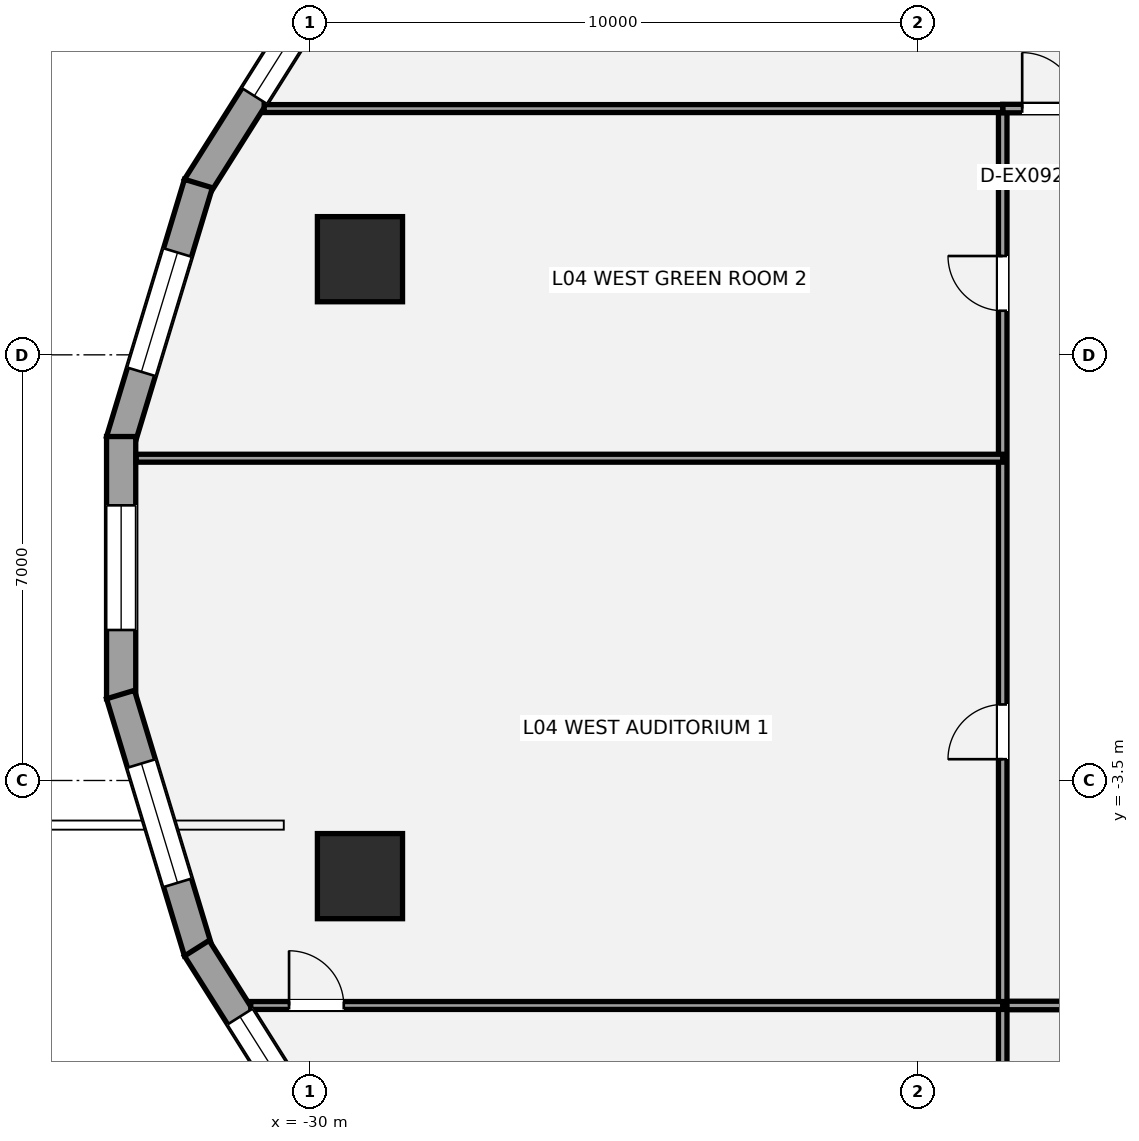
"""IFC4 building model, lengths in metres.
Left out: names, types, materials, properties, quantities, classifications, styles, units other than length and angle.
Written with IfcOpenShell. Run it as: python <this file> out.ifc"""

import sys

from ifc_helpers import new_model, si_unit, direction, frame, frame_2d, origin, origin_2d, place, context, subcontext, project, spatial, rectangle, hollow_circle, extrude, element, fill, save


model = new_model("IFC4")
c1 = context("Model", 3, precision=1e-05, world=origin(), true_north=direction((0.0, 1.0)))
c2 = subcontext(c1, "Body", "Model", "MODEL_VIEW")
j1 = project(units=[si_unit("LENGTHUNIT", "METRE"), si_unit("PLANEANGLEUNIT", "RADIAN")], contexts=[c1])
p1 = place(None, origin())
s1 = spatial("IfcSite", under=j1, at=p1, CompositionType="ELEMENT")
p2 = place(p1, origin())
s2 = spatial("IfcBuilding", under=s1, at=p2, CompositionType="ELEMENT")
p3 = place(p2, frame((0.0, 0.0, 18.6)))
s3 = spatial("IfcBuildingStorey", under=s2, at=p3, CompositionType="ELEMENT", Elevation=18.6)
for number, where, z_axis, x_axis in (
    (1, (-29.171, 5.073, 0.0), (0.0, 0.0, 1.0), (1.0, 0.0, 0.0)),
    (2, (-29.171, -5.073, 0.0), (0.0, 0.0, 1.0), (1.0, 0.0, 0.0)),
):
    element("IfcColumn", number, at=place(p3, frame(where, z_axis=z_axis, x_axis=x_axis)), inside=s3, PredefinedType="USERDEFINED", context=c2, shape_type="SweptSolid", body=[
        extrude(hollow_circle(Radius=0.7, WallThickness=0.05, at=origin_2d()), origin(), (0.0, 0.0, 1.0), 4.2),
    ])
p4 = place(p3, frame((-31.854, 6.258, 0.0), z_axis=(0.0, 0.0, 1.0), x_axis=(0.53349762721, 0.845801561693, 0.0)))
e3 = element("IfcWall", 3, at=p4, inside=s3, PredefinedType="STANDARD", context=c2, shape_type="SweptSolid", body=[
    extrude(rectangle(XDim=4.711, YDim=0.48, at=frame_2d((2.355, 0.0))), origin(), (0.0, 0.0, 1.0), 3.109),
])
p5 = place(p4, frame((1.773, 0.0, 0.72)))
e4 = element("IfcOpeningElement", 4, at=p5, cuts=e3, PredefinedType="OPENING", context=c2, shape_type="SweptSolid", body=[
    extrude(rectangle(XDim=2.05, YDim=1.8, at=frame_2d((1.025, 0.9))), frame((0.0, 0.25, 0.0), z_axis=(0.0, -1.0, 0.0), x_axis=(1.0, 0.0, 0.0)), (0.0, 0.0, 1.0), 0.5),
])
p6 = place(p3, frame((-33.109, 2.087, 0.0), z_axis=(0.0, 0.0, 1.0), x_axis=(0.289855603468, 0.957070388811, 0.0)))
e5 = element("IfcWall", 5, at=p6, inside=s3, PredefinedType="STANDARD", context=c2, shape_type="SweptSolid", body=[
    extrude(rectangle(XDim=4.419, YDim=0.48, at=frame_2d((2.21, 0.0))), origin(), (0.0, 0.0, 1.0), 3.109),
])
p7 = place(p6, frame((1.185, 0.0, 0.72)))
e6 = element("IfcOpeningElement", 6, at=p7, cuts=e5, PredefinedType="OPENING", context=c2, shape_type="SweptSolid", body=[
    extrude(rectangle(XDim=2.05, YDim=1.8, at=frame_2d((1.025, 0.9))), frame((0.0, 0.25, 0.0), z_axis=(0.0, -1.0, 0.0), x_axis=(1.0, 0.0, 0.0)), (0.0, 0.0, 1.0), 0.5),
])
p8 = place(p3, frame((-33.099, -2.156, 0.0), z_axis=(0.0, 0.0, 1.0), x_axis=(0.0, 1.0, 0.0)))
e7 = element("IfcWall", 7, at=p8, inside=s3, PredefinedType="STANDARD", context=c2, shape_type="SweptSolid", body=[
    extrude(rectangle(XDim=4.313, YDim=0.48, at=frame_2d((2.156, 0.0))), origin(), (0.0, 0.0, 1.0), 3.109),
])
p9 = place(p8, frame((1.131, 0.0, 0.72)))
e8 = element("IfcOpeningElement", 8, at=p9, cuts=e7, PredefinedType="OPENING", context=c2, shape_type="SweptSolid", body=[
    extrude(rectangle(XDim=2.05, YDim=1.8, at=frame_2d((1.025, 0.9))), frame((0.0, 0.25, 0.0), z_axis=(0.0, -1.0, 0.0), x_axis=(1.0, 0.0, 0.0)), (0.0, 0.0, 1.0), 0.5),
])
p10 = place(p3, frame((-31.828, -6.317, 0.0), z_axis=(0.0, 0.0, 1.0), x_axis=(-0.289855603468, 0.957070388811, 0.0)))
e9 = element("IfcWall", 9, at=p10, inside=s3, PredefinedType="STANDARD", context=c2, shape_type="SweptSolid", body=[
    extrude(rectangle(XDim=4.419, YDim=0.48, at=frame_2d((2.21, 0.0))), origin(), (0.0, 0.0, 1.0), 3.109),
])
p11 = place(p10, frame((1.185, 0.0, 0.72)))
e10 = element("IfcOpeningElement", 10, at=p11, cuts=e9, PredefinedType="OPENING", context=c2, shape_type="SweptSolid", body=[
    extrude(rectangle(XDim=2.05, YDim=1.8, at=frame_2d((1.025, 0.9))), frame((0.0, 0.25, 0.0), z_axis=(0.0, -1.0, 0.0), x_axis=(1.0, 0.0, 0.0)), (0.0, 0.0, 1.0), 0.5),
])
p12 = place(p3, frame((-29.341, -10.243, 0.0), z_axis=(0.0, 0.0, 1.0), x_axis=(-0.53349762721, 0.845801561693, 0.0)))
e11 = element("IfcWall", 11, at=p12, inside=s3, PredefinedType="STANDARD", context=c2, shape_type="SweptSolid", body=[
    extrude(rectangle(XDim=4.711, YDim=0.48, at=frame_2d((2.355, 0.0))), origin(), (0.0, 0.0, 1.0), 3.109),
])
p13 = place(p12, frame((1.33, 0.0, 0.72)))
e12 = element("IfcOpeningElement", 12, at=p13, cuts=e11, PredefinedType="OPENING", context=c2, shape_type="SweptSolid", body=[
    extrude(rectangle(XDim=2.05, YDim=1.8, at=frame_2d((1.025, 0.9))), frame((0.0, 0.25, 0.0), z_axis=(0.0, -1.0, 0.0), x_axis=(1.0, 0.0, 0.0)), (0.0, 0.0, 1.0), 0.5),
])
p14 = place(p3, frame((-18.6, -7.2, 0.0), z_axis=(0.0, 0.0, 1.0), x_axis=(1.0, 0.0, 0.0)))
e13 = element("IfcWall", 13, at=p14, inside=s3, PredefinedType="PARTITIONING", context=c2, shape_type="SweptSolid", body=[
    extrude(rectangle(XDim=34.6, YDim=0.14, at=frame_2d((17.3, 0.0))), origin(), (0.0, 0.0, 1.0), 3.98),
])
p15 = place(p14, frame((3.6, 0.0, 0.0)))
e14 = element("IfcOpeningElement", 14, at=p15, cuts=e13, PredefinedType="OPENING", context=c2, shape_type="SweptSolid", body=[
    extrude(rectangle(XDim=0.9, YDim=2.1, at=frame_2d((0.45, 1.05))), frame((0.0, 0.08, 0.0), z_axis=(0.0, -1.0, 0.0), x_axis=(1.0, 0.0, 0.0)), (0.0, 0.0, 1.0), 0.16),
])
p16 = place(p14, frame((12.15, 0.0, 0.0)))
e15 = element("IfcOpeningElement", 15, at=p16, cuts=e13, PredefinedType="OPENING", context=c2, shape_type="SweptSolid", body=[
    extrude(rectangle(XDim=0.9, YDim=2.1, at=frame_2d((0.45, 1.05))), frame((0.0, 0.08, 0.0), z_axis=(0.0, -1.0, 0.0), x_axis=(1.0, 0.0, 0.0)), (0.0, 0.0, 1.0), 0.16),
])
p17 = place(p14, frame((20.8, 0.0, 0.0)))
e16 = element("IfcOpeningElement", 16, at=p17, cuts=e13, PredefinedType="OPENING", context=c2, shape_type="SweptSolid", body=[
    extrude(rectangle(XDim=0.9, YDim=2.1, at=frame_2d((0.45, 1.05))), frame((0.0, 0.08, 0.0), z_axis=(0.0, -1.0, 0.0), x_axis=(1.0, 0.0, 0.0)), (0.0, 0.0, 1.0), 0.16),
])
p18 = place(p14, frame((29.55, 0.0, 0.0)))
e17 = element("IfcOpeningElement", 17, at=p18, cuts=e13, PredefinedType="OPENING", context=c2, shape_type="SweptSolid", body=[
    extrude(rectangle(XDim=0.9, YDim=2.1, at=frame_2d((0.45, 1.05))), frame((0.0, 0.08, 0.0), z_axis=(0.0, -1.0, 0.0), x_axis=(1.0, 0.0, 0.0)), (0.0, 0.0, 1.0), 0.16),
])
p19 = place(p3, frame((-18.6, -17.637, 0.0), z_axis=(0.0, 0.0, 1.0), x_axis=(0.0, 1.0, 0.0)))
e18 = element("IfcWall", 18, at=p19, inside=s3, PredefinedType="PARTITIONING", context=c2, shape_type="SweptSolid", body=[
    extrude(rectangle(XDim=25.187, YDim=0.14, at=frame_2d((12.594, 0.0))), origin(), (0.0, 0.0, 1.0), 3.348),
])
p20 = place(p19, frame((14.487, 0.0, 0.0)))
e19 = element("IfcOpeningElement", 19, at=p20, cuts=e18, PredefinedType="OPENING", context=c2, shape_type="SweptSolid", body=[
    extrude(rectangle(XDim=0.9, YDim=2.1, at=frame_2d((0.45, 1.05))), frame((0.0, 0.08, 0.0), z_axis=(0.0, -1.0, 0.0), x_axis=(1.0, 0.0, 0.0)), (0.0, 0.0, 1.0), 0.16),
])
p21 = place(p19, frame((21.862, 0.0, 0.0)))
e20 = element("IfcOpeningElement", 20, at=p21, cuts=e18, PredefinedType="OPENING", context=c2, shape_type="SweptSolid", body=[
    extrude(rectangle(XDim=0.9, YDim=2.1, at=frame_2d((0.45, 1.05))), frame((0.0, 0.08, 0.0), z_axis=(0.0, -1.0, 0.0), x_axis=(1.0, 0.0, 0.0)), (0.0, 0.0, 1.0), 0.16),
])
p22 = place(p3, frame((-18.6, 7.55, 0.0), z_axis=(0.0, 0.0, 1.0), x_axis=(1.0, 0.0, 0.0)))
e21 = element("IfcWall", 21, at=p22, inside=s3, PredefinedType="PARTITIONING", context=c2, shape_type="SweptSolid", body=[
    extrude(rectangle(XDim=4.55, YDim=0.14, at=frame_2d((2.275, 0.0))), origin(), (0.0, 0.0, 1.0), 3.433),
])
p23 = place(p22, frame((0.32, 0.0, 0.0)))
e22 = element("IfcOpeningElement", 22, at=p23, cuts=e21, PredefinedType="OPENING", context=c2, shape_type="SweptSolid", body=[
    extrude(rectangle(XDim=0.92, YDim=2.15, at=frame_2d((0.46, 1.075))), frame((0.0, 0.08, 0.0), z_axis=(0.0, -1.0, 0.0), x_axis=(1.0, 0.0, 0.0)), (0.0, 0.0, 1.0), 0.16),
])
p24 = place(p3, frame((-30.747, 7.55, 0.0), z_axis=(0.0, 0.0, 1.0), x_axis=(1.0, 0.0, 0.0)))
e23 = element("IfcWall", 23, at=p24, inside=s3, PredefinedType="PARTITIONING", context=c2, shape_type="SweptSolid", body=[
    extrude(rectangle(XDim=12.146, YDim=0.13, at=frame_2d((6.073, 0.0))), origin(), (0.0, 0.0, 1.0), 2.958),
])
p25 = place(p3, frame((-30.967, -7.2, 0.0), z_axis=(0.0, 0.0, 1.0), x_axis=(1.0, 0.0, 0.0)))
e24 = element("IfcWall", 24, at=p25, inside=s3, PredefinedType="PARTITIONING", context=c2, shape_type="SweptSolid", body=[
    extrude(rectangle(XDim=12.367, YDim=0.13, at=frame_2d((6.184, 0.0))), origin(), (0.0, 0.0, 1.0), 2.958),
])
p26 = place(p25, frame((0.63, 0.0, 0.0)))
e25 = element("IfcOpeningElement", 25, at=p26, cuts=e24, PredefinedType="OPENING", context=c2, shape_type="SweptSolid", body=[
    extrude(rectangle(XDim=0.9, YDim=2.1, at=frame_2d((0.45, 1.05))), frame((0.0, 0.075, 0.0), z_axis=(0.0, -1.0, 0.0), x_axis=(1.0, 0.0, 0.0)), (0.0, 0.0, 1.0), 0.15),
])
p27 = place(p3, frame((-32.851, 1.8, 0.0), z_axis=(0.0, 0.0, 1.0), x_axis=(1.0, 0.0, 0.0)))
e26 = element("IfcWall", 26, at=p27, inside=s3, PredefinedType="PARTITIONING", context=c2, shape_type="SweptSolid", body=[
    extrude(rectangle(XDim=14.25, YDim=0.13, at=frame_2d((7.125, 0.0))), origin(), (0.0, 0.0, 1.0), 3.433),
])
p28 = place(p5, origin())
e27 = element("IfcWindow", 27, at=p28, inside=s3, PartitioningType="SINGLE_PANEL", PredefinedType="WINDOW", context=c2, shape_type="SweptSolid", body=[
    extrude(rectangle(XDim=2.05, YDim=1.8, at=frame_2d((1.025, 0.9))), frame((0.0, -0.01, 0.0), z_axis=(0.0, -1.0, 0.0), x_axis=(1.0, 0.0, 0.0)), (0.0, 0.0, 1.0), 0.06),
])
fill(e4, e27)
p29 = place(p7, origin())
e28 = element("IfcWindow", 28, at=p29, inside=s3, PartitioningType="SINGLE_PANEL", PredefinedType="WINDOW", context=c2, shape_type="SweptSolid", body=[
    extrude(rectangle(XDim=2.05, YDim=1.8, at=frame_2d((1.025, 0.9))), frame((0.0, -0.01, 0.0), z_axis=(0.0, -1.0, 0.0), x_axis=(1.0, 0.0, 0.0)), (0.0, 0.0, 1.0), 0.06),
])
fill(e6, e28)
p30 = place(p9, origin())
e29 = element("IfcWindow", 29, at=p30, inside=s3, PartitioningType="SINGLE_PANEL", PredefinedType="WINDOW", context=c2, shape_type="SweptSolid", body=[
    extrude(rectangle(XDim=2.05, YDim=1.8, at=frame_2d((1.025, 0.9))), frame((0.0, -0.01, 0.0), z_axis=(0.0, -1.0, 0.0), x_axis=(1.0, 0.0, 0.0)), (0.0, 0.0, 1.0), 0.06),
])
fill(e8, e29)
p31 = place(p11, origin())
e30 = element("IfcWindow", 30, at=p31, inside=s3, PartitioningType="SINGLE_PANEL", PredefinedType="WINDOW", context=c2, shape_type="SweptSolid", body=[
    extrude(rectangle(XDim=2.05, YDim=1.8, at=frame_2d((1.025, 0.9))), frame((0.0, -0.01, 0.0), z_axis=(0.0, -1.0, 0.0), x_axis=(1.0, 0.0, 0.0)), (0.0, 0.0, 1.0), 0.06),
])
fill(e10, e30)
p32 = place(p13, origin())
e31 = element("IfcWindow", 31, at=p32, inside=s3, PartitioningType="SINGLE_PANEL", PredefinedType="WINDOW", context=c2, shape_type="SweptSolid", body=[
    extrude(rectangle(XDim=2.05, YDim=1.8, at=frame_2d((1.025, 0.9))), frame((0.0, -0.01, 0.0), z_axis=(0.0, -1.0, 0.0), x_axis=(1.0, 0.0, 0.0)), (0.0, 0.0, 1.0), 0.06),
])
fill(e12, e31)
p33 = place(p23, origin())
e32 = element("IfcDoor", 32, at=p33, inside=s3, OperationType="SINGLE_SWING_LEFT", PredefinedType="DOOR", context=c2, shape_type="SweptSolid", body=[
    extrude(rectangle(XDim=0.92, YDim=2.15, at=frame_2d((0.46, 1.075))), frame((0.0, 0.025, 0.0), z_axis=(0.0, -1.0, 0.0), x_axis=(1.0, 0.0, 0.0)), (0.0, 0.0, 1.0), 0.05),
])
fill(e22, e32)
p34 = place(p26, origin())
e33 = element("IfcDoor", 33, at=p34, inside=s3, OperationType="SINGLE_SWING_LEFT", PredefinedType="DOOR", context=c2, shape_type="SweptSolid", body=[
    extrude(rectangle(XDim=0.9, YDim=2.1, at=frame_2d((0.45, 1.05))), frame((0.0, 0.025, 0.0), z_axis=(0.0, -1.0, 0.0), x_axis=(1.0, 0.0, 0.0)), (0.0, 0.0, 1.0), 0.05),
])
fill(e25, e33)
p35 = place(p20, origin())
e34 = element("IfcDoor", 34, at=p35, inside=s3, OperationType="SINGLE_SWING_LEFT", PredefinedType="DOOR", context=c2, shape_type="SweptSolid", body=[
    extrude(rectangle(XDim=0.9, YDim=2.1, at=frame_2d((0.45, 1.05))), frame((0.0, 0.025, 0.0), z_axis=(0.0, -1.0, 0.0), x_axis=(1.0, 0.0, 0.0)), (0.0, 0.0, 1.0), 0.05),
])
fill(e19, e34)
p36 = place(p21, origin())
e35 = element("IfcDoor", 35, at=p36, inside=s3, OperationType="SINGLE_SWING_RIGHT", PredefinedType="DOOR", context=c2, shape_type="SweptSolid", body=[
    extrude(rectangle(XDim=0.9, YDim=2.1, at=frame_2d((0.45, 1.05))), frame((0.0, 0.025, 0.0), z_axis=(0.0, -1.0, 0.0), x_axis=(1.0, 0.0, 0.0)), (0.0, 0.0, 1.0), 0.05),
])
fill(e20, e35)
save(model, sys.argv[1])
